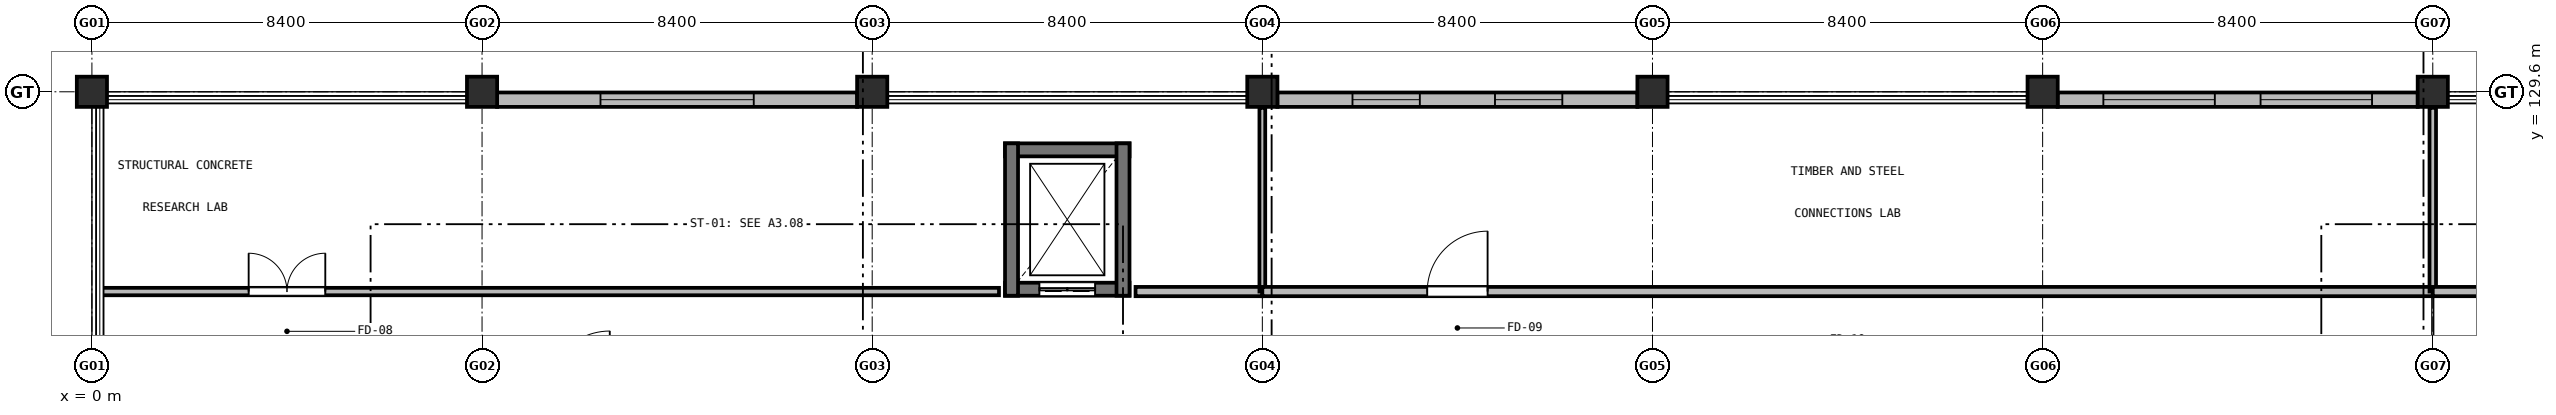
"""IFC4 building model, lengths in metres.
Left out: names, types, materials, properties, quantities, classifications, styles, units other than length and angle.
Written with IfcOpenShell. Run it as: python <this file> out.ifc"""

import sys

from ifc_helpers import new_model, si_unit, direction, frame, frame_2d, origin, origin_2d, place, context, subcontext, project, spatial, rectangle, extrude, element, fill, save


model = new_model("IFC4")
c1 = context("Model", 3, precision=1e-05, world=origin(), true_north=direction((0.0, 1.0)))
c2 = subcontext(c1, "Body", "Model", "MODEL_VIEW")
j1 = project(units=[si_unit("LENGTHUNIT", "METRE"), si_unit("PLANEANGLEUNIT", "RADIAN")], contexts=[c1])
p1 = place(None, origin())
s1 = spatial("IfcSite", under=j1, at=p1, CompositionType="ELEMENT")
p2 = place(p1, origin())
s2 = spatial("IfcBuilding", under=s1, at=p2, CompositionType="ELEMENT")
p3 = place(p2, frame((0.0, 0.0, 13.5)))
s3 = spatial("IfcBuildingStorey", under=s2, at=p3, CompositionType="ELEMENT", Elevation=13.5)
for number, where, z_axis, x_axis in (
    (1, (0.0, 129.6, 0.0), (0.0, 0.0, 1.0), (1.0, 0.0, 0.0)),
    (2, (8.4, 129.6, 0.0), (0.0, 0.0, 1.0), (1.0, 0.0, 0.0)),
    (3, (16.8, 129.6, 0.0), (0.0, 0.0, 1.0), (1.0, 0.0, 0.0)),
    (4, (25.2, 129.6, 0.0), (0.0, 0.0, 1.0), (1.0, 0.0, 0.0)),
    (5, (33.6, 129.6, 0.0), (0.0, 0.0, 1.0), (1.0, 0.0, 0.0)),
    (6, (42.0, 129.6, 0.0), (0.0, 0.0, 1.0), (1.0, 0.0, 0.0)),
    (7, (50.4, 129.6, 0.0), (0.0, 0.0, 1.0), (1.0, 0.0, 0.0)),
):
    element("IfcColumn", number, at=place(p3, frame(where, z_axis=z_axis, x_axis=x_axis)), inside=s3, PredefinedType="COLUMN", context=c2, shape_type="SweptSolid", body=[
        extrude(rectangle(XDim=0.65, YDim=0.65, at=origin_2d()), origin(), (0.0, 0.0, 1.0), 4.2),
    ])
p4 = place(p3, frame((8.723, 129.43, 0.0), z_axis=(0.0, 0.0, 1.0), x_axis=(1.0, 0.0, 0.0)))
e8 = element("IfcWall", 8, at=p4, inside=s3, PredefinedType="SOLIDWALL", context=c2, shape_type="SweptSolid", body=[
    extrude(rectangle(XDim=7.754, YDim=0.31, at=frame_2d((3.877, 0.0))), origin(), (0.0, 0.0, 1.0), 3.16),
])
p5 = place(p4, frame((2.227, 0.0, 0.95)))
e9 = element("IfcOpeningElement", 9, at=p5, cuts=e8, PredefinedType="OPENING", context=c2, shape_type="SweptSolid", body=[
    extrude(rectangle(XDim=3.3, YDim=1.65, at=frame_2d((1.65, 0.825))), frame((0.0, 0.165, 0.0), z_axis=(0.0, -1.0, 0.0), x_axis=(1.0, 0.0, 0.0)), (0.0, 0.0, 1.0), 0.33),
])
p6 = place(p3, frame((25.523, 129.43, 0.0), z_axis=(0.0, 0.0, 1.0), x_axis=(1.0, 0.0, 0.0)))
e10 = element("IfcWall", 10, at=p6, inside=s3, PredefinedType="SOLIDWALL", context=c2, shape_type="SweptSolid", body=[
    extrude(rectangle(XDim=7.754, YDim=0.31, at=frame_2d((3.877, 0.0))), origin(), (0.0, 0.0, 1.0), 3.16),
])
p7 = place(p6, frame((1.618, 0.0, 0.95)))
e11 = element("IfcOpeningElement", 11, at=p7, cuts=e10, PredefinedType="OPENING", context=c2, shape_type="SweptSolid", body=[
    extrude(rectangle(XDim=1.45, YDim=1.85, at=frame_2d((0.725, 0.925))), frame((0.0, 0.165, 0.0), z_axis=(0.0, -1.0, 0.0), x_axis=(1.0, 0.0, 0.0)), (0.0, 0.0, 1.0), 0.33),
])
p8 = place(p6, frame((4.686, 0.0, 0.95)))
e12 = element("IfcOpeningElement", 12, at=p8, cuts=e10, PredefinedType="OPENING", context=c2, shape_type="SweptSolid", body=[
    extrude(rectangle(XDim=1.45, YDim=1.85, at=frame_2d((0.725, 0.925))), frame((0.0, 0.165, 0.0), z_axis=(0.0, -1.0, 0.0), x_axis=(1.0, 0.0, 0.0)), (0.0, 0.0, 1.0), 0.33),
])
p9 = place(p3, frame((42.323, 129.43, 0.0), z_axis=(0.0, 0.0, 1.0), x_axis=(1.0, 0.0, 0.0)))
e13 = element("IfcWall", 13, at=p9, inside=s3, PredefinedType="SOLIDWALL", context=c2, shape_type="SweptSolid", body=[
    extrude(rectangle(XDim=7.754, YDim=0.31, at=frame_2d((3.877, 0.0))), origin(), (0.0, 0.0, 1.0), 3.16),
])
p10 = place(p9, frame((0.985, 0.0, 0.95)))
e14 = element("IfcOpeningElement", 14, at=p10, cuts=e13, PredefinedType="OPENING", context=c2, shape_type="SweptSolid", body=[
    extrude(rectangle(XDim=2.4, YDim=1.96, at=frame_2d((1.2, 0.98))), frame((0.0, 0.165, 0.0), z_axis=(0.0, -1.0, 0.0), x_axis=(1.0, 0.0, 0.0)), (0.0, 0.0, 1.0), 0.33),
])
p11 = place(p9, frame((4.369, 0.0, 0.95)))
e15 = element("IfcOpeningElement", 15, at=p11, cuts=e13, PredefinedType="OPENING", context=c2, shape_type="SweptSolid", body=[
    extrude(rectangle(XDim=2.4, YDim=1.96, at=frame_2d((1.2, 0.98))), frame((0.0, 0.165, 0.0), z_axis=(0.0, -1.0, 0.0), x_axis=(1.0, 0.0, 0.0)), (0.0, 0.0, 1.0), 0.33),
])
p12 = place(p3, frame((22.34, 125.35, 0.0), z_axis=(0.0, 0.0, 1.0), x_axis=(-1.0, 0.0, 0.0)))
e16 = element("IfcWall", 16, at=p12, inside=s3, PredefinedType="SHEAR", context=c2, shape_type="SweptSolid", body=[
    extrude(rectangle(XDim=2.68, YDim=0.28, at=frame_2d((1.34, 0.0))), origin(), (0.0, 0.0, 1.0), 3.88),
])
p13 = place(p12, frame((0.74, 0.0, 0.0)))
e17 = element("IfcOpeningElement", 17, at=p13, cuts=e16, PredefinedType="OPENING", context=c2, shape_type="SweptSolid", body=[
    extrude(rectangle(XDim=1.2, YDim=2.15, at=frame_2d((0.6, 1.075))), frame((0.0, 0.15, 0.0), z_axis=(0.0, -1.0, 0.0), x_axis=(1.0, 0.0, 0.0)), (0.0, 0.0, 1.0), 0.3),
])
p14 = place(p3, frame((19.66, 128.35, 0.0), z_axis=(0.0, 0.0, 1.0), x_axis=(1.0, 0.0, 0.0)))
e18 = element("IfcWall", 18, at=p14, inside=s3, PredefinedType="SHEAR", context=c2, shape_type="SweptSolid", body=[
    extrude(rectangle(XDim=2.68, YDim=0.28, at=frame_2d((1.34, 0.0))), origin(), (0.0, 0.0, 1.0), 3.88),
])
for number, where, z_axis, x_axis in (
    (19, (19.8, 125.21, 0.0), (0.0, 0.0, 1.0), (0.0, 1.0, 0.0)),
    (20, (22.2, 128.49, 0.0), (0.0, 0.0, 1.0), (0.0, -1.0, 0.0)),
):
    element("IfcWall", number, at=place(p3, frame(where, z_axis=z_axis, x_axis=x_axis)), inside=s3, PredefinedType="SHEAR", context=c2, shape_type="SweptSolid", body=[
        extrude(rectangle(XDim=3.28, YDim=0.28, at=frame_2d((1.64, 0.0))), origin(), (0.0, 0.0, 1.0), 3.88),
    ])
p15 = place(p3, frame((0.22, 125.3, 0.0), z_axis=(0.0, 0.0, 1.0), x_axis=(1.0, 0.0, 0.0)))
e21 = element("IfcWall", 21, at=p15, inside=s3, PredefinedType="PARTITIONING", context=c2, shape_type="SweptSolid", body=[
    extrude(rectangle(XDim=19.31, YDim=0.16, at=frame_2d((9.655, 0.0))), origin(), (0.0, 0.0, 1.0), 3.355),
])
p16 = place(p15, frame((3.155, 0.0, 0.0)))
e22 = element("IfcOpeningElement", 22, at=p16, cuts=e21, PredefinedType="OPENING", context=c2, shape_type="SweptSolid", body=[
    extrude(rectangle(XDim=1.65, YDim=2.2, at=frame_2d((0.825, 1.1))), frame((0.0, 0.09, 0.0), z_axis=(0.0, -1.0, 0.0), x_axis=(1.0, 0.0, 0.0)), (0.0, 0.0, 1.0), 0.18),
])
p17 = place(p3, frame((22.47, 125.3, 0.0), z_axis=(0.0, 0.0, 1.0), x_axis=(1.0, 0.0, 0.0)))
e23 = element("IfcWall", 23, at=p17, inside=s3, PredefinedType="SOLIDWALL", context=c2, shape_type="SweptSolid", body=[
    extrude(rectangle(XDim=2.73, YDim=0.2, at=frame_2d((1.365, 0.0))), origin(), (0.0, 0.0, 1.0), 3.355),
])
p18 = place(p3, frame((25.2, 125.3, 0.0), z_axis=(0.0, 0.0, 1.0), x_axis=(0.0, 1.0, 0.0)))
e24 = element("IfcWall", 24, at=p18, inside=s3, PredefinedType="PARTITIONING", context=c2, shape_type="SweptSolid", body=[
    extrude(rectangle(XDim=3.955, YDim=0.125, at=frame_2d((1.978, 0.0))), origin(), (0.0, 0.0, 1.0), 3.155),
])
p19 = place(p3, frame((25.2, 125.3, 0.0), z_axis=(0.0, 0.0, 1.0), x_axis=(1.0, 0.0, 0.0)))
e25 = element("IfcWall", 25, at=p19, inside=s3, PredefinedType="SOLIDWALL", context=c2, shape_type="SweptSolid", body=[
    extrude(rectangle(XDim=25.2, YDim=0.2, at=frame_2d((12.6, 0.0))), origin(), (0.0, 0.0, 1.0), 3.355),
])
p20 = place(p19, frame((3.55, 0.0, 0.0)))
e26 = element("IfcOpeningElement", 26, at=p20, cuts=e25, PredefinedType="OPENING", context=c2, shape_type="SweptSolid", body=[
    extrude(rectangle(XDim=1.3, YDim=2.15, at=frame_2d((0.65, 1.075))), frame((0.0, 0.11, 0.0), z_axis=(0.0, -1.0, 0.0), x_axis=(1.0, 0.0, 0.0)), (0.0, 0.0, 1.0), 0.22),
])
p21 = place(p3, frame((50.4, 125.3, 0.0), z_axis=(0.0, 0.0, 1.0), x_axis=(0.0, 1.0, 0.0)))
e27 = element("IfcWall", 27, at=p21, inside=s3, PredefinedType="PARTITIONING", context=c2, shape_type="SweptSolid", body=[
    extrude(rectangle(XDim=3.955, YDim=0.14, at=frame_2d((1.978, 0.0))), origin(), (0.0, 0.0, 1.0), 3.155),
])
p22 = place(p3, frame((50.4, 125.3, 0.0), z_axis=(0.0, 0.0, 1.0), x_axis=(1.0, 0.0, 0.0)))
e28 = element("IfcWall", 28, at=p22, inside=s3, PredefinedType="SOLIDWALL", context=c2, shape_type="SweptSolid", body=[
    extrude(rectangle(XDim=2.73, YDim=0.2, at=frame_2d((1.365, 0.0))), origin(), (0.0, 0.0, 1.0), 3.355),
])
p23 = place(p22, frame((1.23, 0.0, 0.0)))
e29 = element("IfcOpeningElement", 29, at=p23, cuts=e28, PredefinedType="OPENING", context=c2, shape_type="SweptSolid", body=[
    extrude(rectangle(XDim=1.05, YDim=2.15, at=frame_2d((0.525, 1.075))), frame((0.0, 0.11, 0.0), z_axis=(0.0, -1.0, 0.0), x_axis=(1.0, 0.0, 0.0)), (0.0, 0.0, 1.0), 0.22),
])
p24 = place(p5, origin())
e30 = element("IfcWindow", 30, at=p24, inside=s3, PartitioningType="SINGLE_PANEL", PredefinedType="WINDOW", context=c2, shape_type="SweptSolid", body=[
    extrude(rectangle(XDim=3.3, YDim=1.65, at=frame_2d((1.65, 0.825))), frame((0.0, 0.03, 0.0), z_axis=(0.0, -1.0, 0.0), x_axis=(1.0, 0.0, 0.0)), (0.0, 0.0, 1.0), 0.06),
])
fill(e9, e30)
p25 = place(p7, origin())
e31 = element("IfcWindow", 31, at=p25, inside=s3, PartitioningType="SINGLE_PANEL", PredefinedType="WINDOW", context=c2, shape_type="SweptSolid", body=[
    extrude(rectangle(XDim=1.45, YDim=1.85, at=frame_2d((0.725, 0.925))), frame((0.0, 0.03, 0.0), z_axis=(0.0, -1.0, 0.0), x_axis=(1.0, 0.0, 0.0)), (0.0, 0.0, 1.0), 0.06),
])
fill(e11, e31)
p26 = place(p8, origin())
e32 = element("IfcWindow", 32, at=p26, inside=s3, PartitioningType="SINGLE_PANEL", PredefinedType="WINDOW", context=c2, shape_type="SweptSolid", body=[
    extrude(rectangle(XDim=1.45, YDim=1.85, at=frame_2d((0.725, 0.925))), frame((0.0, 0.03, 0.0), z_axis=(0.0, -1.0, 0.0), x_axis=(1.0, 0.0, 0.0)), (0.0, 0.0, 1.0), 0.06),
])
fill(e12, e32)
p27 = place(p10, origin())
e33 = element("IfcWindow", 33, at=p27, inside=s3, PartitioningType="SINGLE_PANEL", PredefinedType="WINDOW", context=c2, shape_type="SweptSolid", body=[
    extrude(rectangle(XDim=2.4, YDim=1.96, at=frame_2d((1.2, 0.98))), frame((0.0, 0.03, 0.0), z_axis=(0.0, -1.0, 0.0), x_axis=(1.0, 0.0, 0.0)), (0.0, 0.0, 1.0), 0.06),
])
fill(e14, e33)
p28 = place(p11, origin())
e34 = element("IfcWindow", 34, at=p28, inside=s3, PartitioningType="SINGLE_PANEL", PredefinedType="WINDOW", context=c2, shape_type="SweptSolid", body=[
    extrude(rectangle(XDim=2.4, YDim=1.96, at=frame_2d((1.2, 0.98))), frame((0.0, 0.03, 0.0), z_axis=(0.0, -1.0, 0.0), x_axis=(1.0, 0.0, 0.0)), (0.0, 0.0, 1.0), 0.06),
])
fill(e15, e34)
p29 = place(p13, origin())
e35 = element("IfcDoor", 35, at=p29, inside=s3, OperationType="DOUBLE_DOOR_SLIDING", PredefinedType="DOOR", context=c2, shape_type="SweptSolid", body=[
    extrude(rectangle(XDim=1.2, YDim=2.15, at=frame_2d((0.6, 1.075))), frame((0.0, 0.025, 0.0), z_axis=(0.0, -1.0, 0.0), x_axis=(1.0, 0.0, 0.0)), (0.0, 0.0, 1.0), 0.05),
])
fill(e17, e35)
p30 = place(p16, origin())
e36 = element("IfcDoor", 36, at=p30, inside=s3, OperationType="DOUBLE_DOOR_SINGLE_SWING", PredefinedType="DOOR", context=c2, shape_type="SweptSolid", body=[
    extrude(rectangle(XDim=1.65, YDim=2.2, at=frame_2d((0.825, 1.1))), frame((0.0, 0.025, 0.0), z_axis=(0.0, -1.0, 0.0), x_axis=(1.0, 0.0, 0.0)), (0.0, 0.0, 1.0), 0.05),
])
fill(e22, e36)
p31 = place(p20, origin())
e37 = element("IfcDoor", 37, at=p31, inside=s3, OperationType="SINGLE_SWING_RIGHT", PredefinedType="DOOR", context=c2, shape_type="SweptSolid", body=[
    extrude(rectangle(XDim=1.3, YDim=2.15, at=frame_2d((0.65, 1.075))), frame((0.0, 0.025, 0.0), z_axis=(0.0, -1.0, 0.0), x_axis=(1.0, 0.0, 0.0)), (0.0, 0.0, 1.0), 0.05),
])
fill(e26, e37)
save(model, sys.argv[1])
